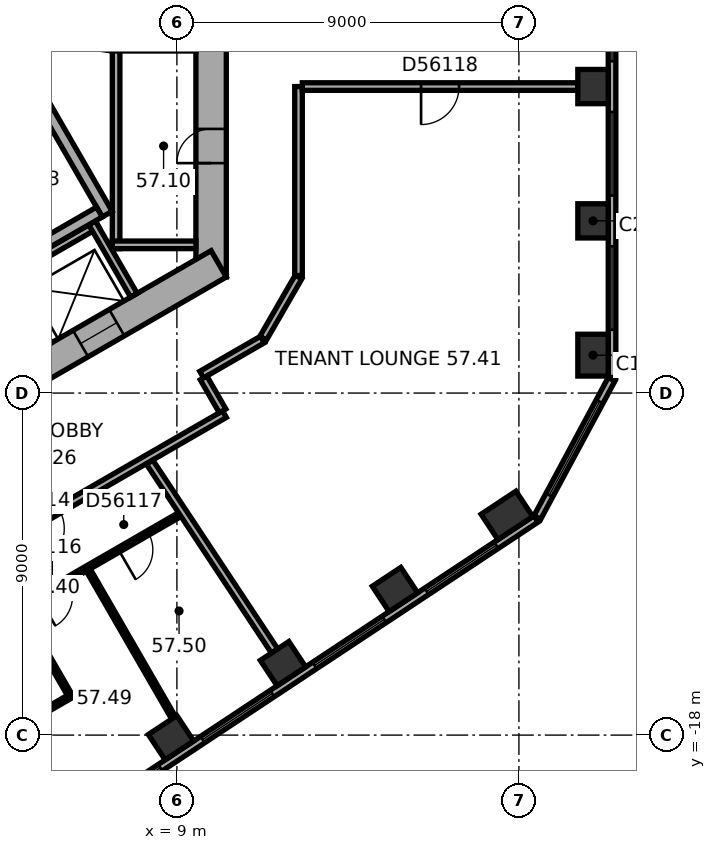
"""IFC4 building model, lengths in metres.
Left out: names, types, materials, properties, quantities, classifications, styles, units other than length and angle.
Written with IfcOpenShell. Run it as: python <this file> out.ifc"""

import sys

from ifc_helpers import new_model, si_unit, direction, frame, frame_2d, origin, origin_2d, place, context, subcontext, project, spatial, rectangle, extrude, element, fill, save


model = new_model("IFC4")
c1 = context("Model", 3, precision=1e-05, world=origin(), true_north=direction((0.0, 1.0)))
c2 = subcontext(c1, "Body", "Model", "MODEL_VIEW")
j1 = project(units=[si_unit("LENGTHUNIT", "METRE"), si_unit("PLANEANGLEUNIT", "RADIAN")], contexts=[c1])
p1 = place(None, origin())
s1 = spatial("IfcSite", under=j1, at=p1, CompositionType="ELEMENT")
p2 = place(p1, origin())
s2 = spatial("IfcBuilding", under=s1, at=p2, CompositionType="ELEMENT")
p3 = place(p2, frame((0.0, 0.0, 232.8)))
s3 = spatial("IfcBuildingStorey", under=s2, at=p3, CompositionType="ELEMENT", Elevation=232.8)
p4 = place(p3, frame((19.95, -8.003, 0.0), z_axis=(0.0, 0.0, 1.0), x_axis=(0.0, 1.0, 0.0)))
e1 = element("IfcColumn", 1, at=p4, inside=s3, PredefinedType="COLUMN", context=c2, shape_type="SweptSolid", body=[
    extrude(rectangle(XDim=1.1, YDim=0.8, at=origin_2d()), origin(), (0.0, 0.0, 1.0), 3.7),
])
for number, where, z_axis, x_axis in (
    (2, (19.95, -4.469, 0.0), (0.0, 0.0, 1.0), (0.0, 1.0, 0.0)),
    (3, (19.95, -0.936, 0.0), (0.0, 0.0, 1.0), (0.0, 1.0, 0.0)),
    (4, (8.844, -18.07, 0.0), (0.0, 0.0, 1.0), (0.834, 0.552, 0.0)),
    (5, (11.791, -16.12, 0.0), (0.0, 0.0, 1.0), (0.834, 0.552, 0.0)),
    (6, (14.738, -14.169, 0.0), (0.0, 0.0, 1.0), (0.834, 0.552, 0.0)),
):
    element("IfcColumn", number, at=place(p3, frame(where, z_axis=z_axis, x_axis=x_axis)), inside=s3, PredefinedType="COLUMN", context=c2, shape_type="SweptSolid", body=[
        extrude(rectangle(XDim=0.9, YDim=0.8, at=origin_2d()), origin(), (0.0, 0.0, 1.0), 3.7),
    ])
p5 = place(p3, frame((17.685, -12.219, 0.0), z_axis=(0.0, 0.0, 1.0), x_axis=(0.833885822067, 0.551936985312, 0.0)))
e7 = element("IfcColumn", 7, at=p5, inside=s3, PredefinedType="COLUMN", context=c2, shape_type="SweptSolid", body=[
    extrude(rectangle(XDim=1.1, YDim=0.8, at=origin_2d()), origin(), (0.0, 0.0, 1.0), 3.7),
])
p6 = place(p3, frame((9.9, -5.947, 0.0), z_axis=(0.0, 0.0, 1.0), x_axis=(0.0, 1.0, 0.0)))
e8 = element("IfcWall", 8, at=p6, inside=s3, PredefinedType="SHEAR", context=c2, shape_type="SweptSolid", body=[
    extrude(rectangle(XDim=11.894, YDim=0.8, at=frame_2d((5.947, 0.0))), origin(), (0.0, 0.0, 1.0), 3.7),
])
p7 = place(p6, frame((6.147, 0.0, 0.0)))
e9 = element("IfcOpeningElement", 9, at=p7, cuts=e8, PredefinedType="OPENING", context=c2, shape_type="SweptSolid", body=[
    extrude(rectangle(XDim=1.5, YDim=2.1, at=frame_2d((0.75, 1.05))), frame((0.0, 0.41, 0.0), z_axis=(0.0, -1.0, 0.0), x_axis=(1.0, 0.0, 0.0)), (0.0, 0.0, 1.0), 0.82),
])
p8 = place(p6, frame((2.997, 0.0, 0.0)))
e10 = element("IfcOpeningElement", 10, at=p8, cuts=e8, PredefinedType="OPENING", context=c2, shape_type="SweptSolid", body=[
    extrude(rectangle(XDim=0.9, YDim=2.1, at=frame_2d((0.45, 1.05))), frame((0.0, 0.41, 0.0), z_axis=(0.0, -1.0, 0.0), x_axis=(1.0, 0.0, 0.0)), (0.0, 0.0, 1.0), 0.82),
])
p9 = place(p3, frame((-0.2, -11.547, 0.0), z_axis=(0.0, 0.0, 1.0), x_axis=(0.866023897231, 0.500002609418, 0.0)))
e11 = element("IfcWall", 11, at=p9, inside=s3, PredefinedType="SHEAR", context=c2, shape_type="SweptSolid", body=[
    extrude(rectangle(XDim=11.894, YDim=0.8, at=frame_2d((5.947, 0.0))), origin(), (0.0, 0.0, 1.0), 3.7),
])
p10 = place(p9, frame((2.497, 0.0, 0.0)))
e12 = element("IfcOpeningElement", 12, at=p10, cuts=e11, PredefinedType="OPENING", context=c2, shape_type="SweptSolid", body=[
    extrude(rectangle(XDim=1.1, YDim=2.1, at=frame_2d((0.55, 1.05))), frame((0.0, 0.41, 0.0), z_axis=(0.0, -1.0, 0.0), x_axis=(1.0, 0.0, 0.0)), (0.0, 0.0, 1.0), 0.82),
])
p11 = place(p9, frame((5.097, 0.0, 0.0)))
e13 = element("IfcOpeningElement", 13, at=p11, cuts=e11, PredefinedType="OPENING", context=c2, shape_type="SweptSolid", body=[
    extrude(rectangle(XDim=1.1, YDim=2.1, at=frame_2d((0.55, 1.05))), frame((0.0, 0.41, 0.0), z_axis=(0.0, -1.0, 0.0), x_axis=(1.0, 0.0, 0.0)), (0.0, 0.0, 1.0), 0.82),
])
p12 = place(p9, frame((7.697, 0.0, 0.0)))
e14 = element("IfcOpeningElement", 14, at=p12, cuts=e11, PredefinedType="OPENING", context=c2, shape_type="SweptSolid", body=[
    extrude(rectangle(XDim=1.1, YDim=2.1, at=frame_2d((0.55, 1.05))), frame((0.0, 0.41, 0.0), z_axis=(0.0, -1.0, 0.0), x_axis=(1.0, 0.0, 0.0)), (0.0, 0.0, 1.0), 0.82),
])
p13 = place(p3, frame((20.45, -8.59, 0.0), z_axis=(0.0, 0.0, 1.0), x_axis=(0.0, 1.0, 0.0)))
e15 = element("IfcWall", 15, at=p13, inside=s3, PredefinedType="STANDARD", context=c2, shape_type="SweptSolid", body=[
    extrude(rectangle(XDim=18.841, YDim=0.2, at=frame_2d((9.421, 0.0))), origin(), (0.0, 0.0, 1.0), 3.7),
])
p14 = place(p13, frame((1.254, 0.0, 0.9)))
e16 = element("IfcOpeningElement", 16, at=p14, cuts=e15, PredefinedType="OPENING", context=c2, shape_type="SweptSolid", body=[
    extrude(rectangle(XDim=2.2, YDim=2.0, at=frame_2d((1.1, 1.0))), frame((0.0, 0.11, 0.0), z_axis=(0.0, -1.0, 0.0), x_axis=(1.0, 0.0, 0.0)), (0.0, 0.0, 1.0), 0.22),
])
p15 = place(p13, frame((4.788, 0.0, 0.9)))
e17 = element("IfcOpeningElement", 17, at=p15, cuts=e15, PredefinedType="OPENING", context=c2, shape_type="SweptSolid", body=[
    extrude(rectangle(XDim=2.2, YDim=2.0, at=frame_2d((1.1, 1.0))), frame((0.0, 0.11, 0.0), z_axis=(0.0, -1.0, 0.0), x_axis=(1.0, 0.0, 0.0)), (0.0, 0.0, 1.0), 0.22),
])
p16 = place(p13, frame((8.322, 0.0, 0.9)))
e18 = element("IfcOpeningElement", 18, at=p16, cuts=e15, PredefinedType="OPENING", context=c2, shape_type="SweptSolid", body=[
    extrude(rectangle(XDim=2.2, YDim=2.0, at=frame_2d((1.1, 1.0))), frame((0.0, 0.11, 0.0), z_axis=(0.0, -1.0, 0.0), x_axis=(1.0, 0.0, 0.0)), (0.0, 0.0, 1.0), 0.22),
])
p17 = place(p13, frame((11.855, 0.0, 0.9)))
e19 = element("IfcOpeningElement", 19, at=p17, cuts=e15, PredefinedType="OPENING", context=c2, shape_type="SweptSolid", body=[
    extrude(rectangle(XDim=2.2, YDim=2.0, at=frame_2d((1.1, 1.0))), frame((0.0, 0.11, 0.0), z_axis=(0.0, -1.0, 0.0), x_axis=(1.0, 0.0, 0.0)), (0.0, 0.0, 1.0), 0.22),
])
p18 = place(p13, frame((15.389, 0.0, 0.9)))
e20 = element("IfcOpeningElement", 20, at=p18, cuts=e15, PredefinedType="OPENING", context=c2, shape_type="SweptSolid", body=[
    extrude(rectangle(XDim=2.2, YDim=2.0, at=frame_2d((1.1, 1.0))), frame((0.0, 0.11, 0.0), z_axis=(0.0, -1.0, 0.0), x_axis=(1.0, 0.0, 0.0)), (0.0, 0.0, 1.0), 0.22),
])
p19 = place(p3, frame((2.739, -22.711, 0.0), z_axis=(0.0, 0.0, 1.0), x_axis=(0.833885723098, 0.551937134838, 0.0)))
e21 = element("IfcWall", 21, at=p19, inside=s3, PredefinedType="STANDARD", context=c2, shape_type="SweptSolid", body=[
    extrude(rectangle(XDim=18.841, YDim=0.2, at=frame_2d((9.421, 0.0))), origin(), (0.0, 0.0, 1.0), 3.7),
])
p20 = place(p19, frame((1.252, 0.0, 0.9)))
e22 = element("IfcOpeningElement", 22, at=p20, cuts=e21, PredefinedType="OPENING", context=c2, shape_type="SweptSolid", body=[
    extrude(rectangle(XDim=2.2, YDim=2.0, at=frame_2d((1.1, 1.0))), frame((0.0, 0.11, 0.0), z_axis=(0.0, -1.0, 0.0), x_axis=(1.0, 0.0, 0.0)), (0.0, 0.0, 1.0), 0.22),
])
p21 = place(p19, frame((4.786, 0.0, 0.9)))
e23 = element("IfcOpeningElement", 23, at=p21, cuts=e21, PredefinedType="OPENING", context=c2, shape_type="SweptSolid", body=[
    extrude(rectangle(XDim=2.2, YDim=2.0, at=frame_2d((1.1, 1.0))), frame((0.0, 0.11, 0.0), z_axis=(0.0, -1.0, 0.0), x_axis=(1.0, 0.0, 0.0)), (0.0, 0.0, 1.0), 0.22),
])
p22 = place(p19, frame((8.32, 0.0, 0.9)))
e24 = element("IfcOpeningElement", 24, at=p22, cuts=e21, PredefinedType="OPENING", context=c2, shape_type="SweptSolid", body=[
    extrude(rectangle(XDim=2.2, YDim=2.0, at=frame_2d((1.1, 1.0))), frame((0.0, 0.11, 0.0), z_axis=(0.0, -1.0, 0.0), x_axis=(1.0, 0.0, 0.0)), (0.0, 0.0, 1.0), 0.22),
])
p23 = place(p19, frame((11.854, 0.0, 0.9)))
e25 = element("IfcOpeningElement", 25, at=p23, cuts=e21, PredefinedType="OPENING", context=c2, shape_type="SweptSolid", body=[
    extrude(rectangle(XDim=2.2, YDim=2.0, at=frame_2d((1.1, 1.0))), frame((0.0, 0.11, 0.0), z_axis=(0.0, -1.0, 0.0), x_axis=(1.0, 0.0, 0.0)), (0.0, 0.0, 1.0), 0.22),
])
p24 = place(p19, frame((15.387, 0.0, 0.9)))
e26 = element("IfcOpeningElement", 26, at=p24, cuts=e21, PredefinedType="OPENING", context=c2, shape_type="SweptSolid", body=[
    extrude(rectangle(XDim=2.2, YDim=2.0, at=frame_2d((1.1, 1.0))), frame((0.0, 0.11, 0.0), z_axis=(0.0, -1.0, 0.0), x_axis=(1.0, 0.0, 0.0)), (0.0, 0.0, 1.0), 0.22),
])
p25 = place(p3, frame((18.483, -12.276, 0.0), z_axis=(0.0, 0.0, 1.0), x_axis=(0.473267675015, 0.880918672629, 0.0)))
e27 = element("IfcWall", 27, at=p25, inside=s3, PredefinedType="STANDARD", context=c2, shape_type="SweptSolid", body=[
    extrude(rectangle(XDim=4.13, YDim=0.2, at=frame_2d((2.065, 0.0))), origin(), (0.0, 0.0, 1.0), 3.7),
])
p26 = place(p25, frame((0.665, 0.0, 0.9)))
e28 = element("IfcOpeningElement", 28, at=p26, cuts=e27, PredefinedType="OPENING", context=c2, shape_type="SweptSolid", body=[
    extrude(rectangle(XDim=2.8, YDim=2.0, at=frame_2d((1.4, 1.0))), frame((0.0, 0.11, 0.0), z_axis=(0.0, -1.0, 0.0), x_axis=(1.0, 0.0, 0.0)), (0.0, 0.0, 1.0), 0.22),
])
p27 = place(p3, frame((7.4, -5.2, 0.0), z_axis=(0.0, 0.0, 1.0), x_axis=(0.0, 1.0, 0.0)))
e29 = element("IfcWall", 29, at=p27, inside=s3, PredefinedType="PARTITIONING", context=c2, shape_type="SweptSolid", body=[
    extrude(rectangle(XDim=5.4, YDim=0.2, at=frame_2d((2.7, 0.0))), origin(), (0.0, 0.0, 1.0), 3.42),
])
p28 = place(p3, frame((7.3, -5.1, 0.0), z_axis=(0.0, 0.0, 1.0), x_axis=(1.0, 0.0, 0.0)))
e30 = element("IfcWall", 30, at=p28, inside=s3, PredefinedType="PARTITIONING", context=c2, shape_type="SweptSolid", body=[
    extrude(rectangle(XDim=2.2, YDim=0.2, at=frame_2d((1.1, 0.0))), origin(), (0.0, 0.0, 1.0), 3.42),
])
p29 = place(p3, frame((-0.024, -8.559, 0.0), z_axis=(0.0, 0.0, 1.0), x_axis=(0.866026010844, 0.49999894854, 0.0)))
e31 = element("IfcWall", 31, at=p29, inside=s3, PredefinedType="PARTITIONING", context=c2, shape_type="SweptSolid", body=[
    extrude(rectangle(XDim=8.0, YDim=0.2, at=frame_2d((4.0, 0.0))), origin(), (0.0, 0.0, 1.0), 3.42),
])
p30 = place(p3, frame((6.768, -4.522, 0.0), z_axis=(0.0, 0.0, 1.0), x_axis=(0.50002983664, -0.866008176907, 0.0)))
e32 = element("IfcWall", 32, at=p30, inside=s3, PredefinedType="PARTITIONING", context=c2, shape_type="SweptSolid", body=[
    extrude(rectangle(XDim=2.2, YDim=0.2, at=frame_2d((1.1, 0.0))), origin(), (0.0, 0.0, 1.0), 3.42),
])
p31 = place(p3, frame((4.816, -0.222, 0.0), z_axis=(0.0, 0.0, 1.0), x_axis=(0.499977259774, -0.866038532462, 0.0)))
e33 = element("IfcWall", 33, at=p31, inside=s3, PredefinedType="SHEAR", context=c2, shape_type="SweptSolid", body=[
    extrude(rectangle(XDim=4.7, YDim=0.3, at=frame_2d((2.35, 0.0))), origin(), (0.0, 0.0, 1.0), 3.42),
])
p32 = place(p3, frame((0.847, -7.767, 0.0), z_axis=(0.0, 0.0, 1.0), x_axis=(0.866027801685, 0.499995846692, 0.0)))
e34 = element("IfcWall", 34, at=p32, inside=s3, PredefinedType="SHEAR", context=c2, shape_type="SweptSolid", body=[
    extrude(rectangle(XDim=7.06, YDim=0.3, at=frame_2d((3.53, 0.0))), origin(), (0.0, 0.0, 1.0), 3.42),
])
p33 = place(p3, frame((2.716, -13.906, 0.0), z_axis=(0.0, 0.0, 1.0), x_axis=(0.866040290674, 0.499974214264, 0.0)))
e35 = element("IfcWall", 35, at=p33, inside=s3, PredefinedType="PARTITIONING", context=c2, shape_type="SweptSolid", body=[
    extrude(rectangle(XDim=8.702, YDim=0.2, at=frame_2d((4.351, 0.0))), origin(), (0.0, 0.0, 1.0), 3.42),
])
p34 = place(p33, frame((2.679, 0.0, 0.0)))
e36 = element("IfcOpeningElement", 36, at=p34, cuts=e35, PredefinedType="OPENING", context=c2, shape_type="SweptSolid", body=[
    extrude(rectangle(XDim=1.0, YDim=2.1, at=frame_2d((0.5, 1.05))), frame((0.0, 0.11, 0.0), z_axis=(0.0, -1.0, 0.0), x_axis=(1.0, 0.0, 0.0)), (0.0, 0.0, 1.0), 0.22),
])
p35 = place(p3, frame((3.117, -15.638, 0.0), z_axis=(0.0, 0.0, 1.0), x_axis=(0.866031365477, 0.499989673903, 0.0)))
e37 = element("IfcWall", 37, at=p35, inside=s3, PredefinedType="PARTITIONING", context=c2, shape_type="SweptSolid", body=[
    extrude(rectangle(XDim=6.881, YDim=0.12, at=frame_2d((3.44, 0.0))), origin(), (0.0, 0.0, 1.0), 3.42),
])
p36 = place(p35, frame((0.5, 0.0, 0.0)))
e38 = element("IfcOpeningElement", 38, at=p36, cuts=e37, PredefinedType="OPENING", context=c2, shape_type="SweptSolid", body=[
    extrude(rectangle(XDim=1.0, YDim=2.1, at=frame_2d((0.5, 1.05))), frame((0.0, 0.07, 0.0), z_axis=(0.0, -1.0, 0.0), x_axis=(1.0, 0.0, 0.0)), (0.0, 0.0, 1.0), 0.14),
])
p37 = place(p35, frame((2.583, 0.0, 0.0)))
e39 = element("IfcOpeningElement", 39, at=p37, cuts=e37, PredefinedType="OPENING", context=c2, shape_type="SweptSolid", body=[
    extrude(rectangle(XDim=0.9, YDim=2.1, at=frame_2d((0.45, 1.05))), frame((0.0, 0.07, 0.0), z_axis=(0.0, -1.0, 0.0), x_axis=(1.0, 0.0, 0.0)), (0.0, 0.0, 1.0), 0.14),
])
p38 = place(p35, frame((5.023, 0.0, 0.0)))
e40 = element("IfcOpeningElement", 40, at=p38, cuts=e37, PredefinedType="OPENING", context=c2, shape_type="SweptSolid", body=[
    extrude(rectangle(XDim=0.9, YDim=2.1, at=frame_2d((0.45, 1.05))), frame((0.0, 0.07, 0.0), z_axis=(0.0, -1.0, 0.0), x_axis=(1.0, 0.0, 0.0)), (0.0, 0.0, 1.0), 0.14),
])
p39 = place(p3, frame((4.61, -17.893, 0.0), z_axis=(0.0, 0.0, 1.0), x_axis=(0.866023842607, 0.500002704028, 0.0)))
e41 = element("IfcWall", 41, at=p39, inside=s3, PredefinedType="PARTITIONING", context=c2, shape_type="SweptSolid", body=[
    extrude(rectangle(XDim=1.835, YDim=0.12, at=frame_2d((0.917, 0.0))), origin(), (0.0, 0.0, 1.0), 3.42),
])
p40 = place(p3, frame((5.677, -19.687, 0.0), z_axis=(0.0, 0.0, 1.0), x_axis=(-0.551936619203, 0.833886064389, 0.0)))
e42 = element("IfcWall", 42, at=p40, inside=s3, PredefinedType="PARTITIONING", context=c2, shape_type="SweptSolid", body=[
    extrude(rectangle(XDim=7.592, YDim=0.2, at=frame_2d((3.796, 0.0))), origin(), (0.0, 0.0, 1.0), 3.42),
])
p41 = place(p3, frame((6.169, -16.924, 0.0), z_axis=(0.0, 0.0, 1.0), x_axis=(-0.500047388771, 0.865998042136, 0.0)))
e43 = element("IfcWall", 43, at=p41, inside=s3, PredefinedType="PARTITIONING", context=c2, shape_type="SweptSolid", body=[
    extrude(rectangle(XDim=2.58, YDim=0.12, at=frame_2d((1.29, 0.0))), origin(), (0.0, 0.0, 1.0), 3.42),
])
p42 = place(p3, frame((8.912, -17.545, 0.0), z_axis=(0.0, 0.0, 1.0), x_axis=(-0.500022113525, 0.866012636158, 0.0)))
e44 = element("IfcWall", 44, at=p42, inside=s3, PredefinedType="PARTITIONING", context=c2, shape_type="SweptSolid", body=[
    extrude(rectangle(XDim=4.49, YDim=0.12, at=frame_2d((2.245, 0.0))), origin(), (0.0, 0.0, 1.0), 2.87),
])
p43 = place(p3, frame((9.652, -8.515, 0.0), z_axis=(0.0, 0.0, 1.0), x_axis=(0.866020375458, 0.500008709215, 0.0)))
e45 = element("IfcWall", 45, at=p43, inside=s3, PredefinedType="PARTITIONING", context=c2, shape_type="SweptSolid", body=[
    extrude(rectangle(XDim=1.846, YDim=0.2, at=frame_2d((0.923, 0.0))), origin(), (0.0, 0.0, 1.0), 3.42),
])
p44 = place(p3, frame((10.202, -9.469, 0.0), z_axis=(0.0, 0.0, 1.0), x_axis=(-0.499968756647, 0.866043441391, 0.0)))
e46 = element("IfcWall", 46, at=p44, inside=s3, PredefinedType="PARTITIONING", context=c2, shape_type="SweptSolid", body=[
    extrude(rectangle(XDim=1.001, YDim=0.2, at=frame_2d((0.5, 0.0))), origin(), (0.0, 0.0, 1.0), 3.42),
])
p45 = place(p3, frame((11.27, -7.558, 0.0), z_axis=(0.0, 0.0, 1.0), x_axis=(0.499964847546, 0.866045698112, 0.0)))
e47 = element("IfcWall", 47, at=p45, inside=s3, PredefinedType="PARTITIONING", context=c2, shape_type="SweptSolid", body=[
    extrude(rectangle(XDim=1.86, YDim=0.2, at=frame_2d((0.93, 0.0))), origin(), (0.0, 0.0, 1.0), 3.42),
])
p46 = place(p3, frame((11.571, -15.786, 0.0), z_axis=(0.0, 0.0, 1.0), x_axis=(-0.551944861763, 0.833880608705, 0.0)))
e48 = element("IfcWall", 48, at=p46, inside=s3, PredefinedType="PARTITIONING", context=c2, shape_type="SweptSolid", body=[
    extrude(rectangle(XDim=5.957, YDim=0.2, at=frame_2d((2.979, 0.0))), origin(), (0.0, 0.0, 1.0), 3.42),
])
p47 = place(p3, frame((12.2, -5.907, 0.0), z_axis=(0.0, 0.0, 1.0), x_axis=(0.0, 1.0, 0.0)))
e49 = element("IfcWall", 49, at=p47, inside=s3, PredefinedType="PARTITIONING", context=c2, shape_type="SweptSolid", body=[
    extrude(rectangle(XDim=4.971, YDim=0.2, at=frame_2d((2.486, 0.0))), origin(), (0.0, 0.0, 1.0), 3.42),
])
p48 = place(p3, frame((12.3, -0.936, 0.0), z_axis=(0.0, 0.0, 1.0), x_axis=(1.0, 0.0, 0.0)))
e50 = element("IfcWall", 50, at=p48, inside=s3, PredefinedType="PARTITIONING", context=c2, shape_type="SweptSolid", body=[
    extrude(rectangle(XDim=7.25, YDim=0.2, at=frame_2d((3.625, 0.0))), origin(), (0.0, 0.0, 1.0), 2.87),
])
p49 = place(p48, frame((3.125, 0.0, 0.0)))
e51 = element("IfcOpeningElement", 51, at=p49, cuts=e50, PredefinedType="OPENING", context=c2, shape_type="SweptSolid", body=[
    extrude(rectangle(XDim=1.0, YDim=2.1, at=frame_2d((0.5, 1.05))), frame((0.0, 0.11, 0.0), z_axis=(0.0, -1.0, 0.0), x_axis=(1.0, 0.0, 0.0)), (0.0, 0.0, 1.0), 0.22),
])
p50 = place(p14, origin())
e52 = element("IfcWindow", 52, at=p50, inside=s3, PartitioningType="SINGLE_PANEL", PredefinedType="WINDOW", context=c2, shape_type="SweptSolid", body=[
    extrude(rectangle(XDim=2.2, YDim=2.0, at=frame_2d((1.1, 1.0))), frame((0.0, 0.03, 0.0), z_axis=(0.0, -1.0, 0.0), x_axis=(1.0, 0.0, 0.0)), (0.0, 0.0, 1.0), 0.06),
])
fill(e16, e52)
p51 = place(p15, origin())
e53 = element("IfcWindow", 53, at=p51, inside=s3, PartitioningType="SINGLE_PANEL", PredefinedType="WINDOW", context=c2, shape_type="SweptSolid", body=[
    extrude(rectangle(XDim=2.2, YDim=2.0, at=frame_2d((1.1, 1.0))), frame((0.0, 0.03, 0.0), z_axis=(0.0, -1.0, 0.0), x_axis=(1.0, 0.0, 0.0)), (0.0, 0.0, 1.0), 0.06),
])
fill(e17, e53)
p52 = place(p16, origin())
e54 = element("IfcWindow", 54, at=p52, inside=s3, PartitioningType="SINGLE_PANEL", PredefinedType="WINDOW", context=c2, shape_type="SweptSolid", body=[
    extrude(rectangle(XDim=2.2, YDim=2.0, at=frame_2d((1.1, 1.0))), frame((0.0, 0.03, 0.0), z_axis=(0.0, -1.0, 0.0), x_axis=(1.0, 0.0, 0.0)), (0.0, 0.0, 1.0), 0.06),
])
fill(e18, e54)
p53 = place(p21, origin())
e55 = element("IfcWindow", 55, at=p53, inside=s3, PartitioningType="SINGLE_PANEL", PredefinedType="WINDOW", context=c2, shape_type="SweptSolid", body=[
    extrude(rectangle(XDim=2.2, YDim=2.0, at=frame_2d((1.1, 1.0))), frame((0.0, 0.03, 0.0), z_axis=(0.0, -1.0, 0.0), x_axis=(1.0, 0.0, 0.0)), (0.0, 0.0, 1.0), 0.06),
])
fill(e23, e55)
p54 = place(p22, origin())
e56 = element("IfcWindow", 56, at=p54, inside=s3, PartitioningType="SINGLE_PANEL", PredefinedType="WINDOW", context=c2, shape_type="SweptSolid", body=[
    extrude(rectangle(XDim=2.2, YDim=2.0, at=frame_2d((1.1, 1.0))), frame((0.0, 0.03, 0.0), z_axis=(0.0, -1.0, 0.0), x_axis=(1.0, 0.0, 0.0)), (0.0, 0.0, 1.0), 0.06),
])
fill(e24, e56)
p55 = place(p23, origin())
e57 = element("IfcWindow", 57, at=p55, inside=s3, PartitioningType="SINGLE_PANEL", PredefinedType="WINDOW", context=c2, shape_type="SweptSolid", body=[
    extrude(rectangle(XDim=2.2, YDim=2.0, at=frame_2d((1.1, 1.0))), frame((0.0, 0.03, 0.0), z_axis=(0.0, -1.0, 0.0), x_axis=(1.0, 0.0, 0.0)), (0.0, 0.0, 1.0), 0.06),
])
fill(e25, e57)
p56 = place(p24, origin())
e58 = element("IfcWindow", 58, at=p56, inside=s3, PartitioningType="SINGLE_PANEL", PredefinedType="WINDOW", context=c2, shape_type="SweptSolid", body=[
    extrude(rectangle(XDim=2.2, YDim=2.0, at=frame_2d((1.1, 1.0))), frame((0.0, 0.03, 0.0), z_axis=(0.0, -1.0, 0.0), x_axis=(1.0, 0.0, 0.0)), (0.0, 0.0, 1.0), 0.06),
])
fill(e26, e58)
p57 = place(p26, origin())
e59 = element("IfcWindow", 59, at=p57, inside=s3, PartitioningType="SINGLE_PANEL", PredefinedType="WINDOW", context=c2, shape_type="SweptSolid", body=[
    extrude(rectangle(XDim=2.8, YDim=2.0, at=frame_2d((1.4, 1.0))), frame((0.0, 0.03, 0.0), z_axis=(0.0, -1.0, 0.0), x_axis=(1.0, 0.0, 0.0)), (0.0, 0.0, 1.0), 0.06),
])
fill(e28, e59)
p58 = place(p8, origin())
e60 = element("IfcDoor", 60, at=p58, inside=s3, OperationType="SINGLE_SWING_LEFT", PredefinedType="DOOR", context=c2, shape_type="SweptSolid", body=[
    extrude(rectangle(XDim=0.9, YDim=2.1, at=frame_2d((0.45, 1.05))), frame((0.0, 0.025, 0.0), z_axis=(0.0, -1.0, 0.0), x_axis=(1.0, 0.0, 0.0)), (0.0, 0.0, 1.0), 0.05),
])
fill(e10, e60)
p59 = place(p12, origin())
e61 = element("IfcDoor", 61, at=p59, inside=s3, OperationType="DOUBLE_DOOR_SLIDING", PredefinedType="DOOR", context=c2, shape_type="SweptSolid", body=[
    extrude(rectangle(XDim=1.1, YDim=2.1, at=frame_2d((0.55, 1.05))), frame((0.0, 0.025, 0.0), z_axis=(0.0, -1.0, 0.0), x_axis=(1.0, 0.0, 0.0)), (0.0, 0.0, 1.0), 0.05),
])
fill(e14, e61)
p60 = place(p34, origin())
e62 = element("IfcDoor", 62, at=p60, inside=s3, OperationType="SINGLE_SWING_LEFT", PredefinedType="DOOR", context=c2, shape_type="SweptSolid", body=[
    extrude(rectangle(XDim=1.0, YDim=2.1, at=frame_2d((0.5, 1.05))), frame((0.0, 0.025, 0.0), z_axis=(0.0, -1.0, 0.0), x_axis=(1.0, 0.0, 0.0)), (0.0, 0.0, 1.0), 0.05),
])
fill(e36, e62)
p61 = place(p37, origin())
e63 = element("IfcDoor", 63, at=p61, inside=s3, OperationType="SINGLE_SWING_LEFT", PredefinedType="DOOR", context=c2, shape_type="SweptSolid", body=[
    extrude(rectangle(XDim=0.9, YDim=2.1, at=frame_2d((0.45, 1.05))), frame((0.0, 0.025, 0.0), z_axis=(0.0, -1.0, 0.0), x_axis=(1.0, 0.0, 0.0)), (0.0, 0.0, 1.0), 0.05),
])
fill(e39, e63)
p62 = place(p38, origin())
e64 = element("IfcDoor", 64, at=p62, inside=s3, OperationType="SINGLE_SWING_LEFT", PredefinedType="DOOR", context=c2, shape_type="SweptSolid", body=[
    extrude(rectangle(XDim=0.9, YDim=2.1, at=frame_2d((0.45, 1.05))), frame((0.0, 0.025, 0.0), z_axis=(0.0, -1.0, 0.0), x_axis=(1.0, 0.0, 0.0)), (0.0, 0.0, 1.0), 0.05),
])
fill(e40, e64)
p63 = place(p49, origin())
e65 = element("IfcDoor", 65, at=p63, inside=s3, OperationType="SINGLE_SWING_LEFT", PredefinedType="DOOR", context=c2, shape_type="SweptSolid", body=[
    extrude(rectangle(XDim=1.0, YDim=2.1, at=frame_2d((0.5, 1.05))), frame((0.0, 0.025, 0.0), z_axis=(0.0, -1.0, 0.0), x_axis=(1.0, 0.0, 0.0)), (0.0, 0.0, 1.0), 0.05),
])
fill(e51, e65)
save(model, sys.argv[1])
